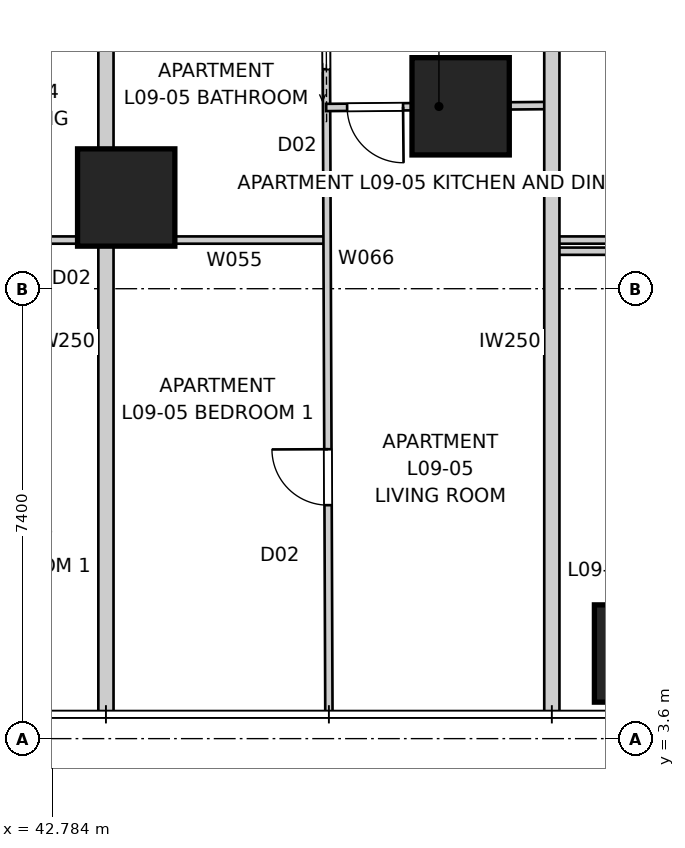
"""IFC4 building model, lengths in metres.
Left out: names, types, materials, properties, quantities, classifications, styles, units other than length and angle.
Written with IfcOpenShell. Run it as: python <this file> out.ifc"""

import sys

from ifc_helpers import new_model, si_unit, direction, frame, frame_2d, origin, origin_2d, place, context, subcontext, project, spatial, rectangle, extrude, element, fill, save


model = new_model("IFC4")
c1 = context("Model", 3, precision=1e-05, world=origin(), true_north=direction((0.0, 1.0)))
c2 = subcontext(c1, "Body", "Model", "MODEL_VIEW")
j1 = project(units=[si_unit("LENGTHUNIT", "METRE"), si_unit("PLANEANGLEUNIT", "RADIAN")], contexts=[c1])
p1 = place(None, origin())
s1 = spatial("IfcSite", under=j1, at=p1, CompositionType="ELEMENT")
p2 = place(p1, origin())
s2 = spatial("IfcBuilding", under=s1, at=p2, CompositionType="ELEMENT")
p3 = place(p2, frame((0.0, 0.0, 35.4)))
s3 = spatial("IfcBuildingStorey", under=s2, at=p3, CompositionType="ELEMENT", Elevation=35.4)
for number, where, z_axis, x_axis in (
    (1, (52.5, 5.0, 0.0), (0.0, 0.0, 1.0), (1.0, 0.0, 0.0)),
    (2, (44.0, 12.5, 0.0), (0.0, 0.0, 1.0), (1.0, 0.0, 0.0)),
    (3, (49.5, 14.0, 0.0), (0.0, 0.0, 1.0), (1.0, 0.0, 0.0)),
):
    element("IfcColumn", number, at=place(p3, frame(where, z_axis=z_axis, x_axis=x_axis)), inside=s3, PredefinedType="COLUMN", context=c2, shape_type="SweptSolid", body=[
        extrude(rectangle(XDim=1.6, YDim=1.6, at=origin_2d()), origin(), (0.0, 0.0, 1.0), 3.4),
    ])
for number, where, z_axis, x_axis in (
    (4, (43.667, 4.0, 0.0), (0.0, 0.0, 1.0), (0.0, 1.0, 0.0)),
    (5, (51.0, 4.0, 0.0), (0.0, 0.0, 1.0), (0.0, 1.0, 0.0)),
):
    element("IfcWall", number, at=place(p3, frame(where, z_axis=z_axis, x_axis=x_axis)), inside=s3, PredefinedType="PARTITIONING", context=c2, shape_type="SweptSolid", body=[
        extrude(rectangle(XDim=12.24, YDim=0.25, at=frame_2d((6.12, 0.0))), origin(), (0.0, 0.0, 1.0), 3.25),
    ])
p4 = place(p3, frame((47.287, 11.8, 0.0), z_axis=(0.0, 0.0, 1.0), x_axis=(-1.0, 0.0, 0.0)))
e6 = element("IfcWall", 6, at=p4, inside=s3, PredefinedType="PARTITIONING", context=c2, shape_type="SweptSolid", body=[
    extrude(rectangle(XDim=22.003, YDim=0.12, at=frame_2d((11.002, 0.0))), origin(), (0.0, 0.0, 1.0), 3.25),
])
p5 = place(p4, frame((15.968, 0.0, 0.0)))
e7 = element("IfcOpeningElement", 7, at=p5, cuts=e6, PredefinedType="OPENING", context=c2, shape_type="SweptSolid", body=[
    extrude(rectangle(XDim=0.92, YDim=2.34, at=frame_2d((0.46, 1.17))), frame((0.0, 0.07, 0.0), z_axis=(0.0, -1.0, 0.0), x_axis=(1.0, 0.0, 0.0)), (0.0, 0.0, 1.0), 0.14),
])
p6 = place(p4, frame((13.47, 0.0, 0.0)))
e8 = element("IfcOpeningElement", 8, at=p6, cuts=e6, PredefinedType="OPENING", context=c2, shape_type="SweptSolid", body=[
    extrude(rectangle(XDim=0.92, YDim=2.34, at=frame_2d((0.46, 1.17))), frame((0.0, 0.07, 0.0), z_axis=(0.0, -1.0, 0.0), x_axis=(1.0, 0.0, 0.0)), (0.0, 0.0, 1.0), 0.14),
])
p7 = place(p4, frame((5.018, 0.0, 0.0)))
e9 = element("IfcOpeningElement", 9, at=p7, cuts=e6, PredefinedType="OPENING", context=c2, shape_type="SweptSolid", body=[
    extrude(rectangle(XDim=0.92, YDim=2.34, at=frame_2d((0.46, 1.17))), frame((0.0, 0.07, 0.0), z_axis=(0.0, -1.0, 0.0), x_axis=(1.0, 0.0, 0.0)), (0.0, 0.0, 1.0), 0.14),
])
p8 = place(p4, frame((19.685, 0.0, 0.0)))
e10 = element("IfcOpeningElement", 10, at=p8, cuts=e6, PredefinedType="OPENING", context=c2, shape_type="SweptSolid", body=[
    extrude(rectangle(XDim=0.92, YDim=2.34, at=frame_2d((0.46, 1.17))), frame((0.0, 0.07, 0.0), z_axis=(0.0, -1.0, 0.0), x_axis=(1.0, 0.0, 0.0)), (0.0, 0.0, 1.0), 0.14),
])
p9 = place(p4, frame((9.138, 0.0, 0.0)))
e11 = element("IfcOpeningElement", 11, at=p9, cuts=e6, PredefinedType="OPENING", context=c2, shape_type="SweptSolid", body=[
    extrude(rectangle(XDim=0.96, YDim=2.1, at=frame_2d((0.48, 1.05))), frame((0.0, 0.07, 0.0), z_axis=(0.0, -1.0, 0.0), x_axis=(1.0, 0.0, 0.0)), (0.0, 0.0, 1.0), 0.14),
])
p10 = place(p3, frame((47.333, 4.04, 0.0), z_axis=(0.0, 0.0, 1.0), x_axis=(-0.003834774141, 0.999992647227, 0.0)))
e12 = element("IfcWall", 12, at=p10, inside=s3, PredefinedType="PARTITIONING", context=c2, shape_type="SweptSolid", body=[
    extrude(rectangle(XDim=12.16, YDim=0.12, at=frame_2d((6.08, 0.0))), origin(), (0.0, 0.0, 1.0), 3.25),
])
p11 = place(p10, frame((10.57, 0.0, 0.0)))
e13 = element("IfcOpeningElement", 13, at=p11, cuts=e12, PredefinedType="OPENING", context=c2, shape_type="SweptSolid", body=[
    extrude(rectangle(XDim=0.96, YDim=2.1, at=frame_2d((0.48, 1.05))), frame((0.0, 0.07, 0.0), z_axis=(0.0, -1.0, 0.0), x_axis=(1.0, 0.0, 0.0)), (0.0, 0.0, 1.0), 0.14),
])
p12 = place(p10, frame((3.4, 0.0, 0.0)))
e14 = element("IfcOpeningElement", 14, at=p12, cuts=e12, PredefinedType="OPENING", context=c2, shape_type="SweptSolid", body=[
    extrude(rectangle(XDim=0.92, YDim=2.34, at=frame_2d((0.46, 1.17))), frame((0.0, 0.07, 0.0), z_axis=(0.0, -1.0, 0.0), x_axis=(1.0, 0.0, 0.0)), (0.0, 0.0, 1.0), 0.14),
])
p13 = place(p3, frame((51.0, 14.013, 0.0), z_axis=(0.0, 0.0, 1.0), x_axis=(-0.999961771263, -0.008743912924, 0.0)))
e15 = element("IfcWall", 15, at=p13, inside=s3, PredefinedType="PARTITIONING", context=c2, shape_type="SweptSolid", body=[
    extrude(rectangle(XDim=3.714, YDim=0.12, at=frame_2d((1.857, 0.0))), origin(), (0.0, 0.0, 1.0), 2.549),
])
p14 = place(p13, frame((2.447, 0.0, 0.0)))
e16 = element("IfcOpeningElement", 16, at=p14, cuts=e15, PredefinedType="OPENING", context=c2, shape_type="SweptSolid", body=[
    extrude(rectangle(XDim=0.92, YDim=2.34, at=frame_2d((0.46, 1.17))), frame((0.0, 0.07, 0.0), z_axis=(0.0, -1.0, 0.0), x_axis=(1.0, 0.0, 0.0)), (0.0, 0.0, 1.0), 0.14),
])
p15 = place(p3, frame((58.2, 11.8, 0.0), z_axis=(0.0, 0.0, 1.0), x_axis=(-1.0, 0.0, 0.0)))
e17 = element("IfcWall", 17, at=p15, inside=s3, PredefinedType="PARTITIONING", context=c2, shape_type="SweptSolid", body=[
    extrude(rectangle(XDim=7.2, YDim=0.12, at=frame_2d((3.6, 0.0))), origin(), (0.0, 0.0, 1.0), 3.25),
])
p16 = place(p3, frame((58.333, 11.617, 0.0), z_axis=(0.0, 0.0, 1.0), x_axis=(-1.0, 0.0, 0.0)))
e18 = element("IfcWall", 18, at=p16, inside=s3, PredefinedType="PARTITIONING", context=c2, shape_type="SweptSolid", body=[
    extrude(rectangle(XDim=7.333, YDim=0.12, at=frame_2d((3.667, 0.0))), origin(), (0.0, 0.0, 1.0), 3.25),
])
p17 = place(p14, origin())
e19 = element("IfcDoor", 19, at=p17, inside=s3, OperationType="SINGLE_SWING_LEFT", PredefinedType="DOOR", context=c2, shape_type="SweptSolid", body=[
    extrude(rectangle(XDim=0.92, YDim=2.34, at=frame_2d((0.46, 1.17))), frame((0.0, 0.025, 0.0), z_axis=(0.0, -1.0, 0.0), x_axis=(1.0, 0.0, 0.0)), (0.0, 0.0, 1.0), 0.05),
])
fill(e16, e19)
p18 = place(p11, origin())
e20 = element("IfcDoor", 20, at=p18, inside=s3, OperationType="SLIDING_TO_LEFT", PredefinedType="DOOR", context=c2, shape_type="SweptSolid", body=[
    extrude(rectangle(XDim=0.96, YDim=2.1, at=frame_2d((0.48, 1.05))), frame((0.0, 0.025, 0.0), z_axis=(0.0, -1.0, 0.0), x_axis=(1.0, 0.0, 0.0)), (0.0, 0.0, 1.0), 0.05),
])
fill(e13, e20)
p19 = place(p12, origin())
e21 = element("IfcDoor", 21, at=p19, inside=s3, OperationType="SINGLE_SWING_RIGHT", PredefinedType="DOOR", context=c2, shape_type="SweptSolid", body=[
    extrude(rectangle(XDim=0.92, YDim=2.34, at=frame_2d((0.46, 1.17))), frame((0.0, 0.025, 0.0), z_axis=(0.0, -1.0, 0.0), x_axis=(1.0, 0.0, 0.0)), (0.0, 0.0, 1.0), 0.05),
])
fill(e14, e21)
save(model, sys.argv[1])
